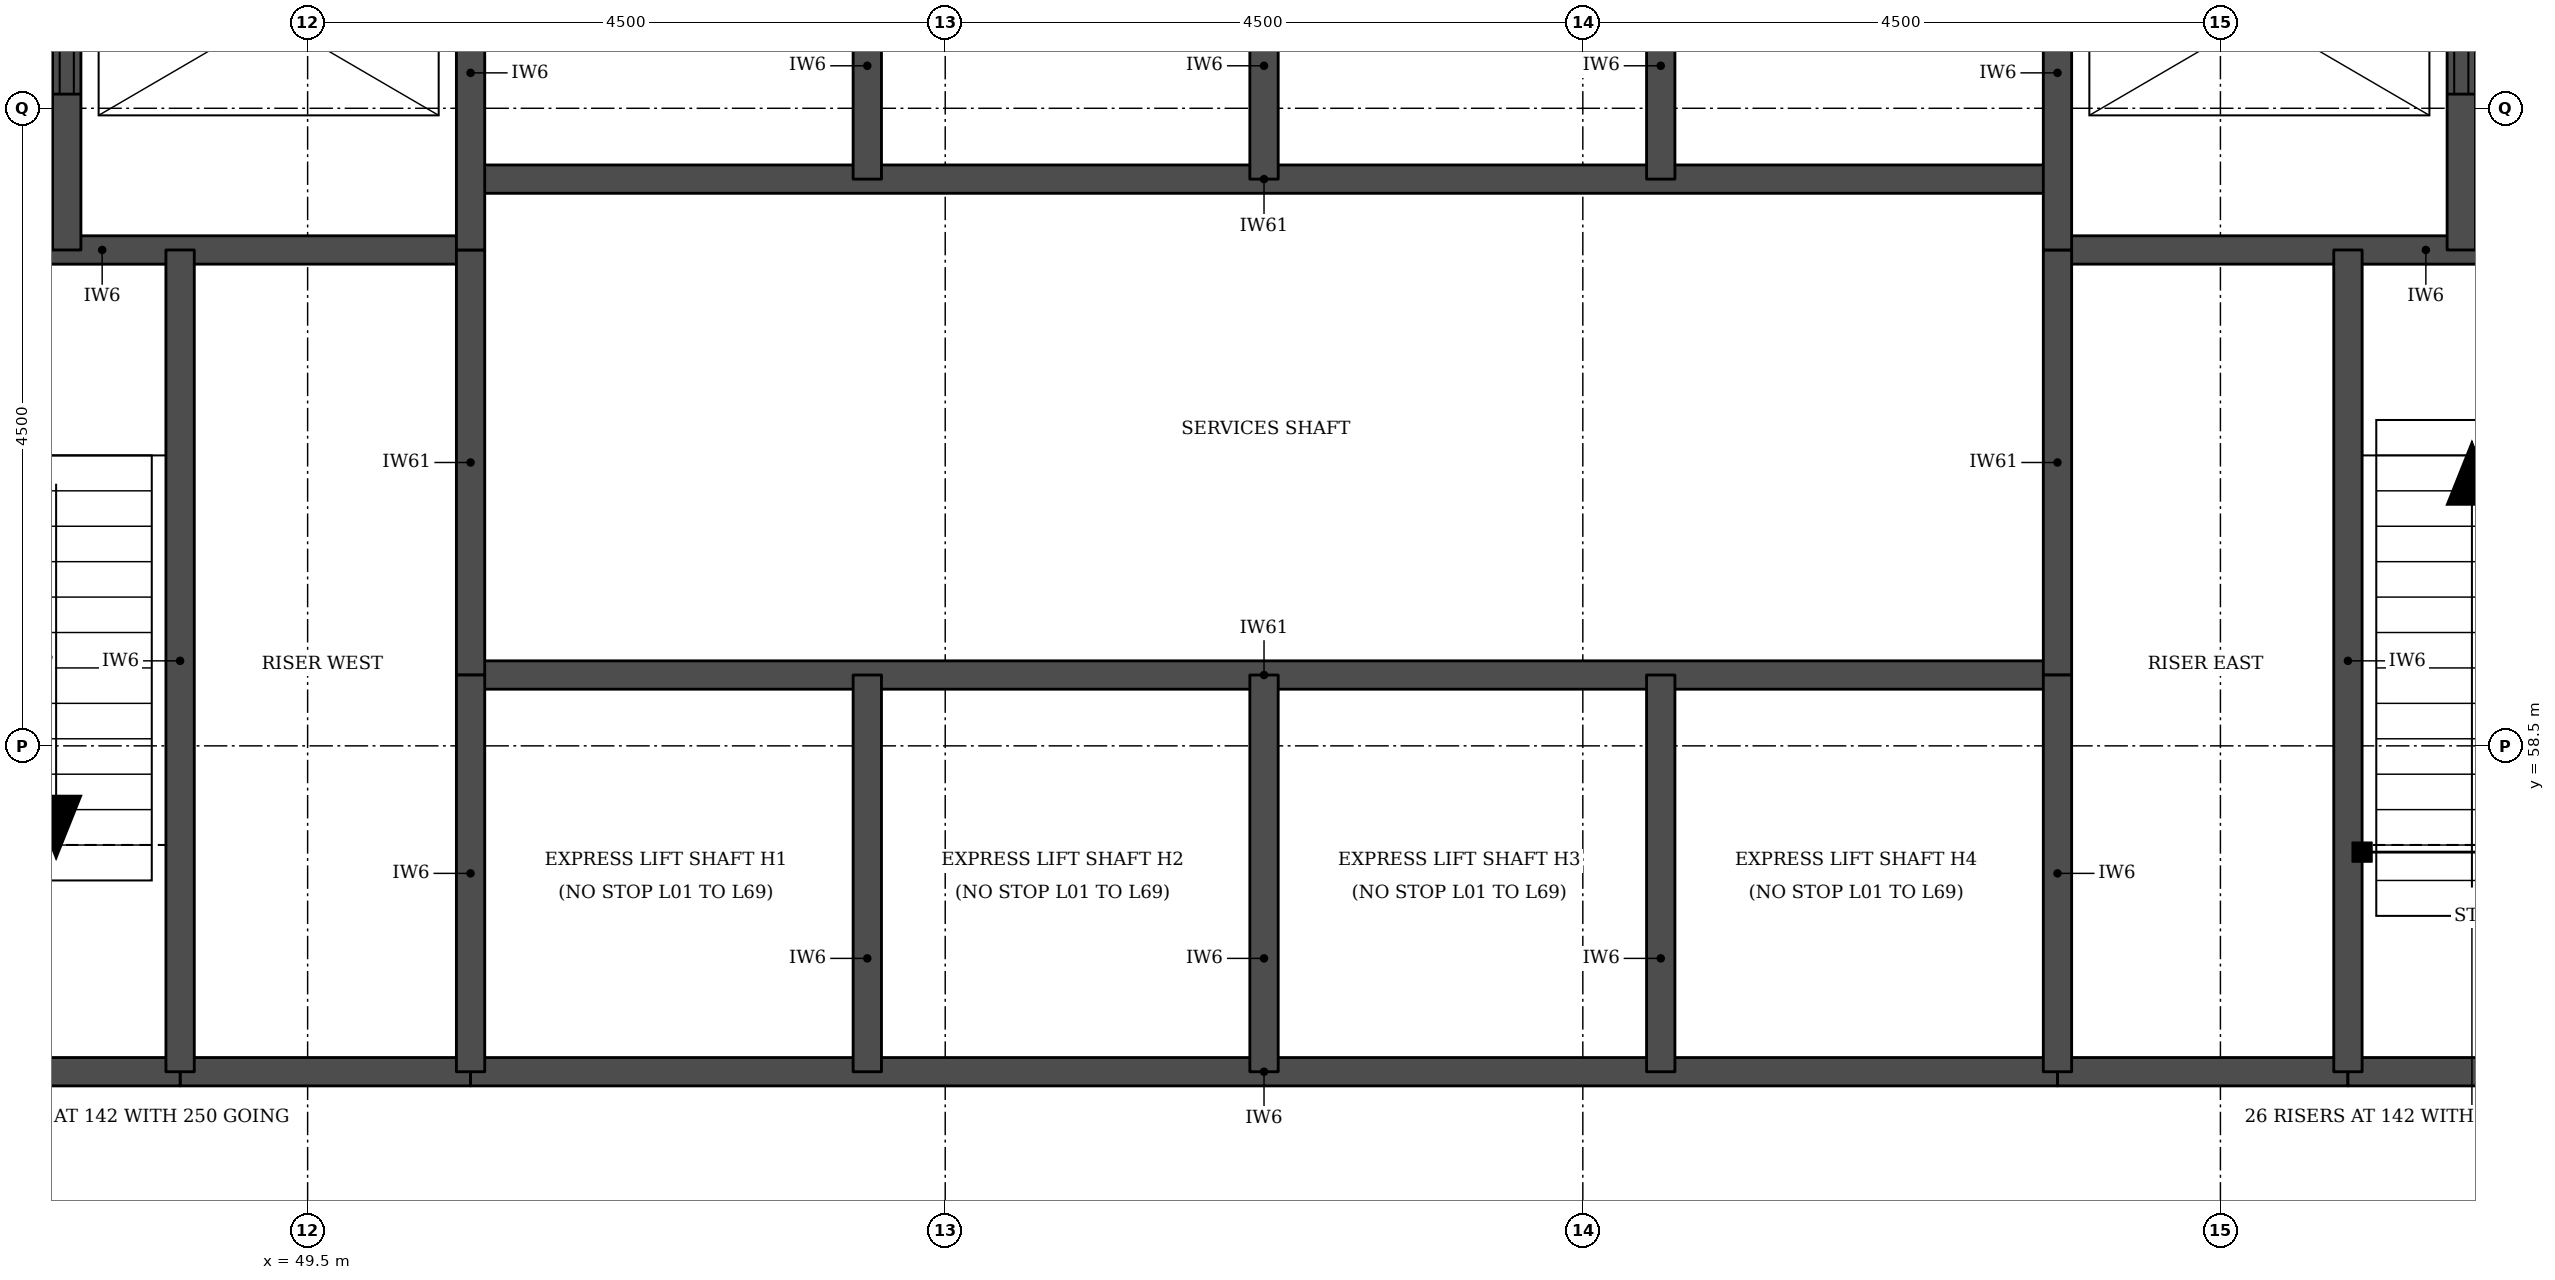
"""IFC4 building model, lengths in metres.
Left out: names, types, materials, properties, quantities, classifications, styles, units other than length and angle.
Written with IfcOpenShell. Run it as: python <this file> out.ifc"""

import sys

from ifc_helpers import new_model, si_unit, direction, frame, frame_2d, origin, place, context, subcontext, project, spatial, rectangle, extrude, element, fill, save


model = new_model("IFC4")
c1 = context("Model", 3, precision=1e-05, world=origin(), true_north=direction((0.0, 1.0)))
c2 = subcontext(c1, "Body", "Model", "MODEL_VIEW")
j1 = project(units=[si_unit("LENGTHUNIT", "METRE"), si_unit("PLANEANGLEUNIT", "RADIAN")], contexts=[c1])
p1 = place(None, origin())
s1 = spatial("IfcSite", under=j1, at=p1, CompositionType="ELEMENT")
p2 = place(p1, origin())
s2 = spatial("IfcBuilding", under=s1, at=p2, CompositionType="ELEMENT")
p3 = place(p2, frame((0.0, 0.0, 97.4)))
s3 = spatial("IfcBuildingStorey", under=s2, at=p3, CompositionType="ELEMENT", Elevation=97.4)
for number, where, z_axis, x_axis in (
    (1, (48.6, 56.2, 0.0), (0.0, 0.0, 1.0), (1.0, 0.0, 0.0)),
    (2, (61.85, 56.2, 0.0), (0.0, 0.0, 1.0), (1.0, 0.0, 0.0)),
):
    element("IfcWall", number, at=place(p3, frame(where, z_axis=z_axis, x_axis=x_axis)), inside=s3, PredefinedType="SOLIDWALL", context=c2, shape_type="SweptSolid", body=[
        extrude(rectangle(XDim=2.05, YDim=0.2, at=frame_2d((1.025, 0.0))), origin(), (0.0, 0.0, 1.0), 3.55),
    ])
p4 = place(p3, frame((45.45, 56.2, 0.0), z_axis=(0.0, 0.0, 1.0), x_axis=(1.0, 0.0, 0.0)))
e3 = element("IfcWall", 3, at=p4, inside=s3, PredefinedType="SOLIDWALL", context=c2, shape_type="SweptSolid", body=[
    extrude(rectangle(XDim=3.15, YDim=0.2, at=frame_2d((1.575, 0.0))), origin(), (0.0, 0.0, 1.0), 3.55),
])
p5 = place(p3, frame((50.65, 56.2, 0.0), z_axis=(0.0, 0.0, 1.0), x_axis=(1.0, 0.0, 0.0)))
e4 = element("IfcWall", 4, at=p5, inside=s3, PredefinedType="SOLIDWALL", context=c2, shape_type="SweptSolid", body=[
    extrude(rectangle(XDim=11.2, YDim=0.2, at=frame_2d((5.6, 0.0))), origin(), (0.0, 0.0, 1.0), 3.55),
])
p6 = place(p3, frame((63.9, 56.2, 0.0), z_axis=(0.0, 0.0, 1.0), x_axis=(1.0, 0.0, 0.0)))
e5 = element("IfcWall", 5, at=p6, inside=s3, PredefinedType="SOLIDWALL", context=c2, shape_type="SweptSolid", body=[
    extrude(rectangle(XDim=3.15, YDim=0.2, at=frame_2d((1.575, 0.0))), origin(), (0.0, 0.0, 1.0), 3.55),
])
p7 = place(p3, frame((50.65, 59.0, 0.0), z_axis=(0.0, 0.0, 1.0), x_axis=(1.0, 0.0, 0.0)))
e6 = element("IfcWall", 6, at=p7, inside=s3, PredefinedType="SOLIDWALL", context=c2, shape_type="SweptSolid", body=[
    extrude(rectangle(XDim=11.2, YDim=0.2, at=frame_2d((5.6, 0.0))), origin(), (0.0, 0.0, 1.0), 3.7),
])
for number, where, z_axis, x_axis in (
    (7, (45.45, 62.0, 0.0), (0.0, 0.0, 1.0), (1.0, 0.0, 0.0)),
    (8, (61.85, 62.0, 0.0), (0.0, 0.0, 1.0), (1.0, 0.0, 0.0)),
):
    element("IfcWall", number, at=place(p3, frame(where, z_axis=z_axis, x_axis=x_axis)), inside=s3, PredefinedType="SOLIDWALL", context=c2, shape_type="SweptSolid", body=[
        extrude(rectangle(XDim=5.2, YDim=0.2, at=frame_2d((2.6, 0.0))), origin(), (0.0, 0.0, 1.0), 3.55),
    ])
p8 = place(p3, frame((50.65, 62.5, 0.0), z_axis=(0.0, 0.0, 1.0), x_axis=(1.0, 0.0, 0.0)))
e9 = element("IfcWall", 9, at=p8, inside=s3, PredefinedType="SOLIDWALL", context=c2, shape_type="SweptSolid", body=[
    extrude(rectangle(XDim=11.2, YDim=0.2, at=frame_2d((5.6, 0.0))), origin(), (0.0, 0.0, 1.0), 3.7),
])
p9 = place(p3, frame((47.8, 62.0, 0.0), z_axis=(0.0, 0.0, 1.0), x_axis=(0.0, 1.0, 0.0)))
e10 = element("IfcWall", 10, at=p9, inside=s3, PredefinedType="SOLIDWALL", context=c2, shape_type="SweptSolid", body=[
    extrude(rectangle(XDim=3.3, YDim=0.2, at=frame_2d((1.65, 0.0))), origin(), (0.0, 0.0, 1.0), 3.55),
])
p10 = place(p9, frame((1.1, 0.0, 0.0)))
e11 = element("IfcOpeningElement", 11, at=p10, cuts=e10, PredefinedType="OPENING", context=c2, shape_type="SweptSolid", body=[
    extrude(rectangle(XDim=1.1, YDim=2.1, at=frame_2d((0.55, 1.05))), frame((0.0, 0.11, 0.0), z_axis=(0.0, -1.0, 0.0), x_axis=(1.0, 0.0, 0.0)), (0.0, 0.0, 1.0), 0.22),
])
p11 = place(p3, frame((48.6, 56.2, 0.0), z_axis=(0.0, 0.0, 1.0), x_axis=(0.0, 1.0, 0.0)))
e12 = element("IfcWall", 12, at=p11, inside=s3, PredefinedType="SOLIDWALL", context=c2, shape_type="SweptSolid", body=[
    extrude(rectangle(XDim=5.8, YDim=0.2, at=frame_2d((2.9, 0.0))), origin(), (0.0, 0.0, 1.0), 3.55),
])
p12 = place(p3, frame((50.65, 59.0, 0.0), z_axis=(0.0, 0.0, 1.0), x_axis=(0.0, 1.0, 0.0)))
e13 = element("IfcWall", 13, at=p12, inside=s3, PredefinedType="SOLIDWALL", context=c2, shape_type="SweptSolid", body=[
    extrude(rectangle(XDim=3.0, YDim=0.2, at=frame_2d((1.5, 0.0))), origin(), (0.0, 0.0, 1.0), 3.7),
])
p13 = place(p3, frame((50.65, 56.2, 0.0), z_axis=(0.0, 0.0, 1.0), x_axis=(0.0, 1.0, 0.0)))
e14 = element("IfcWall", 14, at=p13, inside=s3, PredefinedType="SOLIDWALL", context=c2, shape_type="SweptSolid", body=[
    extrude(rectangle(XDim=2.8, YDim=0.2, at=frame_2d((1.4, 0.0))), origin(), (0.0, 0.0, 1.0), 3.55),
])
p14 = place(p3, frame((50.65, 62.0, 0.0), z_axis=(0.0, 0.0, 1.0), x_axis=(0.0, 1.0, 0.0)))
e15 = element("IfcWall", 15, at=p14, inside=s3, PredefinedType="SOLIDWALL", context=c2, shape_type="SweptSolid", body=[
    extrude(rectangle(XDim=3.3, YDim=0.2, at=frame_2d((1.65, 0.0))), origin(), (0.0, 0.0, 1.0), 3.55),
])
for number, where, z_axis, x_axis in (
    (16, (53.45, 56.2, 0.0), (0.0, 0.0, 1.0), (0.0, 1.0, 0.0)),
    (17, (53.45, 62.5, 0.0), (0.0, 0.0, 1.0), (0.0, 1.0, 0.0)),
    (18, (56.25, 56.2, 0.0), (0.0, 0.0, 1.0), (0.0, 1.0, 0.0)),
    (19, (56.25, 62.5, 0.0), (0.0, 0.0, 1.0), (0.0, 1.0, 0.0)),
    (20, (59.05, 56.2, 0.0), (0.0, 0.0, 1.0), (0.0, 1.0, 0.0)),
    (21, (59.05, 62.5, 0.0), (0.0, 0.0, 1.0), (0.0, 1.0, 0.0)),
):
    element("IfcWall", number, at=place(p3, frame(where, z_axis=z_axis, x_axis=x_axis)), inside=s3, PredefinedType="SOLIDWALL", context=c2, shape_type="SweptSolid", body=[
        extrude(rectangle(XDim=2.8, YDim=0.2, at=frame_2d((1.4, 0.0))), origin(), (0.0, 0.0, 1.0), 3.55),
    ])
p15 = place(p3, frame((61.85, 59.0, 0.0), z_axis=(0.0, 0.0, 1.0), x_axis=(0.0, 1.0, 0.0)))
e22 = element("IfcWall", 22, at=p15, inside=s3, PredefinedType="SOLIDWALL", context=c2, shape_type="SweptSolid", body=[
    extrude(rectangle(XDim=3.0, YDim=0.2, at=frame_2d((1.5, 0.0))), origin(), (0.0, 0.0, 1.0), 3.7),
])
p16 = place(p3, frame((61.85, 56.2, 0.0), z_axis=(0.0, 0.0, 1.0), x_axis=(0.0, 1.0, 0.0)))
e23 = element("IfcWall", 23, at=p16, inside=s3, PredefinedType="SOLIDWALL", context=c2, shape_type="SweptSolid", body=[
    extrude(rectangle(XDim=2.8, YDim=0.2, at=frame_2d((1.4, 0.0))), origin(), (0.0, 0.0, 1.0), 3.55),
])
p17 = place(p3, frame((61.85, 62.0, 0.0), z_axis=(0.0, 0.0, 1.0), x_axis=(0.0, 1.0, 0.0)))
e24 = element("IfcWall", 24, at=p17, inside=s3, PredefinedType="SOLIDWALL", context=c2, shape_type="SweptSolid", body=[
    extrude(rectangle(XDim=3.3, YDim=0.2, at=frame_2d((1.65, 0.0))), origin(), (0.0, 0.0, 1.0), 3.55),
])
p18 = place(p3, frame((63.9, 56.2, 0.0), z_axis=(0.0, 0.0, 1.0), x_axis=(0.0, 1.0, 0.0)))
e25 = element("IfcWall", 25, at=p18, inside=s3, PredefinedType="SOLIDWALL", context=c2, shape_type="SweptSolid", body=[
    extrude(rectangle(XDim=5.8, YDim=0.2, at=frame_2d((2.9, 0.0))), origin(), (0.0, 0.0, 1.0), 3.55),
])
p19 = place(p3, frame((64.7, 62.0, 0.0), z_axis=(0.0, 0.0, 1.0), x_axis=(0.0, 1.0, 0.0)))
e26 = element("IfcWall", 26, at=p19, inside=s3, PredefinedType="SOLIDWALL", context=c2, shape_type="SweptSolid", body=[
    extrude(rectangle(XDim=3.3, YDim=0.2, at=frame_2d((1.65, 0.0))), origin(), (0.0, 0.0, 1.0), 3.55),
])
p20 = place(p19, frame((1.1, 0.0, 0.0)))
e27 = element("IfcOpeningElement", 27, at=p20, cuts=e26, PredefinedType="OPENING", context=c2, shape_type="SweptSolid", body=[
    extrude(rectangle(XDim=1.1, YDim=2.1, at=frame_2d((0.55, 1.05))), frame((0.0, 0.11, 0.0), z_axis=(0.0, -1.0, 0.0), x_axis=(1.0, 0.0, 0.0)), (0.0, 0.0, 1.0), 0.22),
])
p21 = place(p10, origin())
e28 = element("IfcDoor", 28, at=p21, inside=s3, OperationType="DOUBLE_DOOR_SLIDING", PredefinedType="DOOR", context=c2, shape_type="SweptSolid", body=[
    extrude(rectangle(XDim=1.1, YDim=2.1, at=frame_2d((0.55, 1.05))), frame((0.0, 0.025, 0.0), z_axis=(0.0, -1.0, 0.0), x_axis=(1.0, 0.0, 0.0)), (0.0, 0.0, 1.0), 0.05),
])
fill(e11, e28)
p22 = place(p20, origin())
e29 = element("IfcDoor", 29, at=p22, inside=s3, OperationType="DOUBLE_DOOR_SLIDING", PredefinedType="DOOR", context=c2, shape_type="SweptSolid", body=[
    extrude(rectangle(XDim=1.1, YDim=2.1, at=frame_2d((0.55, 1.05))), frame((0.0, 0.025, 0.0), z_axis=(0.0, -1.0, 0.0), x_axis=(1.0, 0.0, 0.0)), (0.0, 0.0, 1.0), 0.05),
])
fill(e27, e29)
save(model, sys.argv[1])
